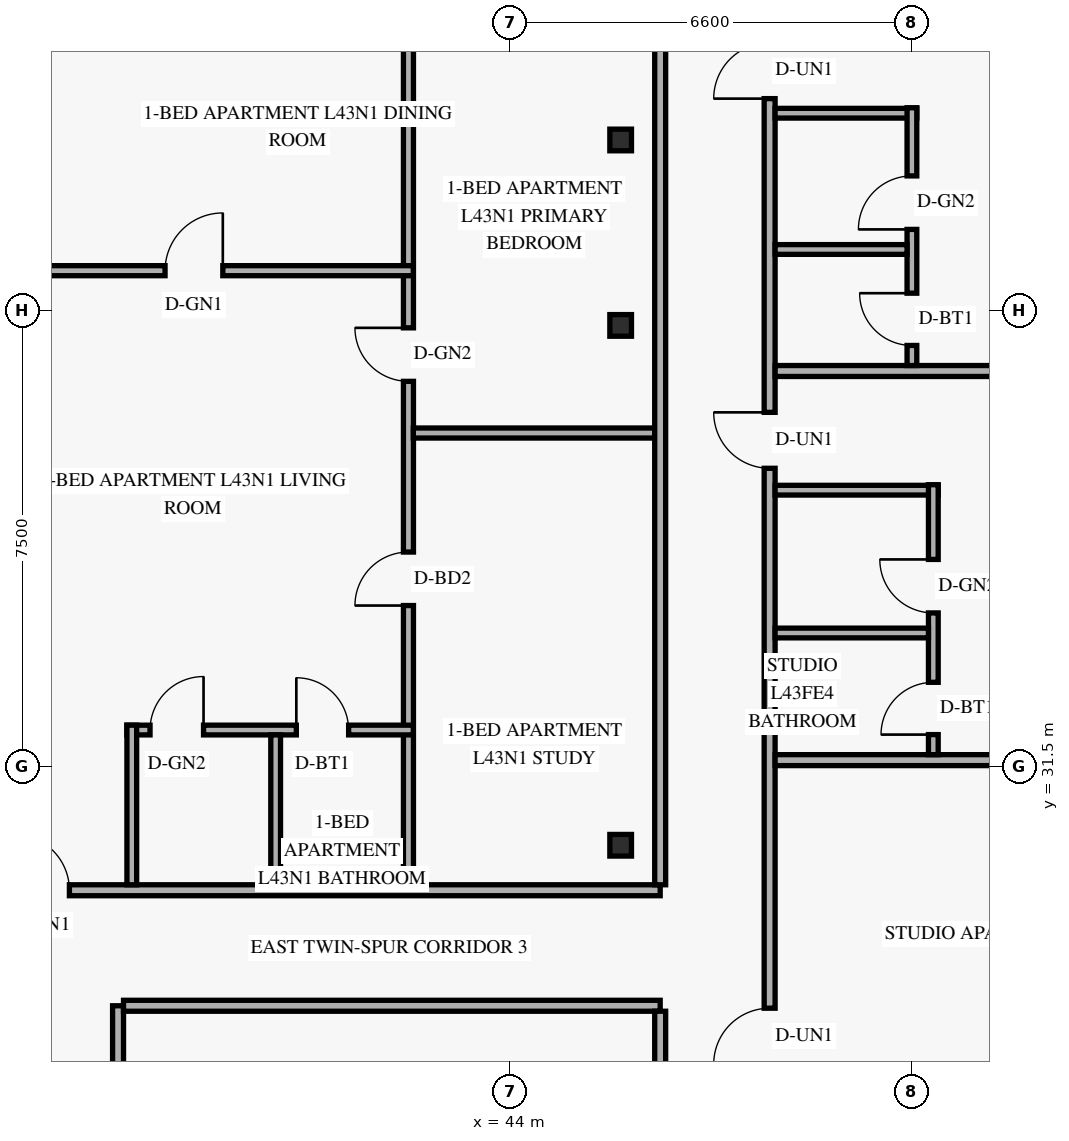
"""IFC4 building model, lengths in metres.
Left out: names, types, materials, properties, quantities, classifications, styles, units other than length and angle.
Written with IfcOpenShell. Run it as: python <this file> out.ifc"""

import sys

from ifc_helpers import new_model, si_unit, direction, frame, frame_2d, origin, origin_2d, place, context, subcontext, project, spatial, rectangle, hollow_rectangle, extrude, element, fill, save


model = new_model("IFC4")
c1 = context("Model", 3, precision=1e-05, world=origin(), true_north=direction((0.0, 1.0)))
c2 = subcontext(c1, "Body", "Model", "MODEL_VIEW")
j1 = project(units=[si_unit("LENGTHUNIT", "METRE"), si_unit("PLANEANGLEUNIT", "RADIAN")], contexts=[c1])
p1 = place(None, origin())
s1 = spatial("IfcSite", under=j1, at=p1, CompositionType="ELEMENT")
p2 = place(p1, origin())
s2 = spatial("IfcBuilding", under=s1, at=p2, CompositionType="ELEMENT")
p3 = place(p2, frame((0.0, 0.0, 166.2)))
s3 = spatial("IfcBuildingStorey", under=s2, at=p3, CompositionType="ELEMENT", Elevation=166.2)
for number, where, z_axis, x_axis in (
    (1, (45.753, 30.2, 0.0), (0.035, 0.0, 0.999), (0.0, 1.0, 0.0)),
    (2, (45.753, 38.75, 0.0), (0.035, 0.0, 0.999), (0.0, 1.0, 0.0)),
    (3, (45.753, 41.8, 0.0), (0.035, 0.0, 0.999), (0.0, 1.0, 0.0)),
):
    element("IfcColumn", number, at=place(p3, frame(where, z_axis=z_axis, x_axis=x_axis)), inside=s3, PredefinedType="COLUMN", context=c2, shape_type="SweptSolid", body=[
        extrude(hollow_rectangle(XDim=0.356, YDim=0.356, WallThickness=0.016, at=origin_2d()), origin(), (0.0, 0.0, 1.0), 3.602),
    ])
p4 = place(p3, frame((37.55, 17.28, 0.0), z_axis=(0.0, 0.0, 1.0), x_axis=(0.0, 1.0, 0.0)))
e4 = element("IfcWall", 4, at=p4, inside=s3, PredefinedType="STANDARD", context=c2, shape_type="SweptSolid", body=[
    extrude(rectangle(XDim=10.28, YDim=0.18, at=frame_2d((5.14, 0.0))), origin(), (0.0, 0.0, 1.0), 2.73),
])
p5 = place(p4, frame((5.0, 0.0, 0.0)))
e5 = element("IfcOpeningElement", 5, at=p5, cuts=e4, PredefinedType="OPENING", context=c2, shape_type="SweptSolid", body=[
    extrude(rectangle(XDim=0.92, YDim=2.15, at=frame_2d((0.46, 1.075))), frame((0.0, 0.1, 0.0), z_axis=(0.0, -1.0, 0.0), x_axis=(1.0, 0.0, 0.0)), (0.0, 0.0, 1.0), 0.2),
])
p6 = place(p3, frame((37.64, 27.56, 0.0), z_axis=(0.0, 0.0, 1.0), x_axis=(1.0, 0.0, 0.0)))
e6 = element("IfcWall", 6, at=p6, inside=s3, PredefinedType="STANDARD", context=c2, shape_type="SweptSolid", body=[
    extrude(rectangle(XDim=8.826, YDim=0.18, at=frame_2d((4.413, 0.0))), origin(), (0.0, 0.0, 1.0), 2.73),
])
p7 = place(p3, frame((35.51, 29.46, 0.0), z_axis=(0.0, 0.0, 1.0), x_axis=(1.0, 0.0, 0.0)))
e7 = element("IfcWall", 7, at=p7, inside=s3, PredefinedType="STANDARD", context=c2, shape_type="SweptSolid", body=[
    extrude(rectangle(XDim=10.956, YDim=0.18, at=frame_2d((5.478, 0.0))), origin(), (0.0, 0.0, 1.0), 2.73),
])
p8 = place(p7, frame((0.32, 0.0, 0.0)))
e8 = element("IfcOpeningElement", 8, at=p8, cuts=e7, PredefinedType="OPENING", context=c2, shape_type="SweptSolid", body=[
    extrude(rectangle(XDim=0.92, YDim=2.15, at=frame_2d((0.46, 1.075))), frame((0.0, 0.1, 0.0), z_axis=(0.0, -1.0, 0.0), x_axis=(1.0, 0.0, 0.0)), (0.0, 0.0, 1.0), 0.2),
])
p9 = place(p3, frame((42.326, 29.55, 0.0), z_axis=(0.0, 0.0, 1.0), x_axis=(0.0, 1.0, 0.0)))
e9 = element("IfcWall", 9, at=p9, inside=s3, PredefinedType="PARTITIONING", context=c2, shape_type="SweptSolid", body=[
    extrude(rectangle(XDim=14.17, YDim=0.165, at=frame_2d((7.085, 0.0))), origin(), (0.0, 0.0, 1.0), 2.73),
])
p10 = place(p9, frame((4.593, 0.0, 0.0)))
e10 = element("IfcOpeningElement", 10, at=p10, cuts=e9, PredefinedType="OPENING", context=c2, shape_type="SweptSolid", body=[
    extrude(rectangle(XDim=0.88, YDim=2.14, at=frame_2d((0.44, 1.07))), frame((0.0, 0.093, 0.0), z_axis=(0.0, -1.0, 0.0), x_axis=(1.0, 0.0, 0.0)), (0.0, 0.0, 1.0), 0.185),
])
p11 = place(p9, frame((8.28, 0.0, 0.0)))
e11 = element("IfcOpeningElement", 11, at=p11, cuts=e9, PredefinedType="OPENING", context=c2, shape_type="SweptSolid", body=[
    extrude(rectangle(XDim=0.88, YDim=2.12, at=frame_2d((0.44, 1.06))), frame((0.0, 0.093, 0.0), z_axis=(0.0, -1.0, 0.0), x_axis=(1.0, 0.0, 0.0)), (0.0, 0.0, 1.0), 0.185),
])
p12 = place(p3, frame((37.696, 32.095, 0.0), z_axis=(0.0, 0.0, 1.0), x_axis=(1.0, 0.0, 0.0)))
e12 = element("IfcWall", 12, at=p12, inside=s3, PredefinedType="PLUMBINGWALL", context=c2, shape_type="SweptSolid", body=[
    extrude(rectangle(XDim=4.71, YDim=0.16, at=frame_2d((2.355, 0.0))), origin(), (0.0, 0.0, 1.0), 3.36),
])
p13 = place(p12, frame((0.38, 0.0, 0.0)))
e13 = element("IfcOpeningElement", 13, at=p13, cuts=e12, PredefinedType="OPENING", context=c2, shape_type="SweptSolid", body=[
    extrude(rectangle(XDim=0.88, YDim=2.12, at=frame_2d((0.44, 1.06))), frame((0.0, 0.09, 0.0), z_axis=(0.0, -1.0, 0.0), x_axis=(1.0, 0.0, 0.0)), (0.0, 0.0, 1.0), 0.18),
])
p14 = place(p12, frame((2.786, 0.0, 0.0)))
e14 = element("IfcOpeningElement", 14, at=p14, cuts=e12, PredefinedType="OPENING", context=c2, shape_type="SweptSolid", body=[
    extrude(rectangle(XDim=0.86, YDim=2.12, at=frame_2d((0.43, 1.06))), frame((0.0, 0.09, 0.0), z_axis=(0.0, -1.0, 0.0), x_axis=(1.0, 0.0, 0.0)), (0.0, 0.0, 1.0), 0.18),
])
p15 = place(p3, frame((37.776, 29.55, 0.0), z_axis=(0.0, 0.0, 1.0), x_axis=(0.0, 1.0, 0.0)))
e15 = element("IfcWall", 15, at=p15, inside=s3, PredefinedType="PLUMBINGWALL", context=c2, shape_type="SweptSolid", body=[
    extrude(rectangle(XDim=2.625, YDim=0.16, at=frame_2d((1.312, 0.0))), origin(), (0.0, 0.0, 1.0), 2.73),
])
p16 = place(p3, frame((40.142, 29.55, 0.0), z_axis=(0.0, 0.0, 1.0), x_axis=(0.0, 1.0, 0.0)))
e16 = element("IfcWall", 16, at=p16, inside=s3, PredefinedType="PLUMBINGWALL", context=c2, shape_type="SweptSolid", body=[
    extrude(rectangle(XDim=2.465, YDim=0.16, at=frame_2d((1.232, 0.0))), origin(), (0.0, 0.0, 1.0), 2.73),
])
p17 = place(p3, frame((35.51, 39.65, 0.0), z_axis=(0.0, 0.0, 1.0), x_axis=(1.0, 0.0, 0.0)))
e17 = element("IfcWall", 17, at=p17, inside=s3, PredefinedType="PARTITIONING", context=c2, shape_type="SweptSolid", body=[
    extrude(rectangle(XDim=6.896, YDim=0.165, at=frame_2d((3.448, 0.0))), origin(), (0.0, 0.0, 1.0), 3.36),
])
p18 = place(p17, frame((2.813, 0.0, 0.0)))
e18 = element("IfcOpeningElement", 18, at=p18, cuts=e17, PredefinedType="OPENING", context=c2, shape_type="SweptSolid", body=[
    extrude(rectangle(XDim=0.95, YDim=2.15, at=frame_2d((0.475, 1.075))), frame((0.0, 0.093, 0.0), z_axis=(0.0, -1.0, 0.0), x_axis=(1.0, 0.0, 0.0)), (0.0, 0.0, 1.0), 0.185),
])
p19 = place(p3, frame((42.406, 36.98, 0.0), z_axis=(0.0, 0.0, 1.0), x_axis=(1.0, 0.0, 0.0)))
e19 = element("IfcWall", 19, at=p19, inside=s3, PredefinedType="PARTITIONING", context=c2, shape_type="SweptSolid", body=[
    extrude(rectangle(XDim=3.97, YDim=0.165, at=frame_2d((1.985, 0.0))), origin(), (0.0, 0.0, 1.0), 2.73),
])
p20 = place(p3, frame((48.266, 4.28, 0.0), z_axis=(0.0, 0.0, 1.0), x_axis=(0.0, 1.0, 0.0)))
e20 = element("IfcWall", 20, at=p20, inside=s3, PredefinedType="STANDARD", context=c2, shape_type="SweptSolid", body=[
    extrude(rectangle(XDim=39.44, YDim=0.18, at=frame_2d((19.72, 0.0))), origin(), (0.0, 0.0, 1.0), 2.73),
])
p21 = place(p20, frame((2.18, 0.0, 0.0)))
e21 = element("IfcOpeningElement", 21, at=p21, cuts=e20, PredefinedType="OPENING", context=c2, shape_type="SweptSolid", body=[
    extrude(rectangle(XDim=0.92, YDim=2.15, at=frame_2d((0.46, 1.075))), frame((0.0, 0.1, 0.0), z_axis=(0.0, -1.0, 0.0), x_axis=(1.0, 0.0, 0.0)), (0.0, 0.0, 1.0), 0.2),
])
p22 = place(p20, frame((13.02, 0.0, 0.0)))
e22 = element("IfcOpeningElement", 22, at=p22, cuts=e20, PredefinedType="OPENING", context=c2, shape_type="SweptSolid", body=[
    extrude(rectangle(XDim=0.92, YDim=2.15, at=frame_2d((0.46, 1.075))), frame((0.0, 0.1, 0.0), z_axis=(0.0, -1.0, 0.0), x_axis=(1.0, 0.0, 0.0)), (0.0, 0.0, 1.0), 0.2),
])
p23 = place(p20, frame((22.32, 0.0, 0.0)))
e23 = element("IfcOpeningElement", 23, at=p23, cuts=e20, PredefinedType="OPENING", context=c2, shape_type="SweptSolid", body=[
    extrude(rectangle(XDim=0.92, YDim=2.15, at=frame_2d((0.46, 1.075))), frame((0.0, 0.1, 0.0), z_axis=(0.0, -1.0, 0.0), x_axis=(1.0, 0.0, 0.0)), (0.0, 0.0, 1.0), 0.2),
])
p24 = place(p20, frame((32.12, 0.0, 0.0)))
e24 = element("IfcOpeningElement", 24, at=p24, cuts=e20, PredefinedType="OPENING", context=c2, shape_type="SweptSolid", body=[
    extrude(rectangle(XDim=0.92, YDim=2.15, at=frame_2d((0.46, 1.075))), frame((0.0, 0.1, 0.0), z_axis=(0.0, -1.0, 0.0), x_axis=(1.0, 0.0, 0.0)), (0.0, 0.0, 1.0), 0.2),
])
p25 = place(p20, frame((38.2, 0.0, 0.0)))
e25 = element("IfcOpeningElement", 25, at=p25, cuts=e20, PredefinedType="OPENING", context=c2, shape_type="SweptSolid", body=[
    extrude(rectangle(XDim=0.92, YDim=2.15, at=frame_2d((0.46, 1.075))), frame((0.0, 0.1, 0.0), z_axis=(0.0, -1.0, 0.0), x_axis=(1.0, 0.0, 0.0)), (0.0, 0.0, 1.0), 0.2),
])
p26 = place(p3, frame((46.466, 17.37, 0.0), z_axis=(0.0, 0.0, 1.0), x_axis=(0.0, 1.0, 0.0)))
e26 = element("IfcWall", 26, at=p26, inside=s3, PredefinedType="STANDARD", context=c2, shape_type="SweptSolid", body=[
    extrude(rectangle(XDim=10.1, YDim=0.18, at=frame_2d((5.05, 0.0))), origin(), (0.0, 0.0, 1.0), 2.73),
])
p27 = place(p3, frame((46.466, 29.55, 0.0), z_axis=(0.0, 0.0, 1.0), x_axis=(0.0, 1.0, 0.0)))
e27 = element("IfcWall", 27, at=p27, inside=s3, PredefinedType="STANDARD", context=c2, shape_type="SweptSolid", body=[
    extrude(rectangle(XDim=14.17, YDim=0.18, at=frame_2d((7.085, 0.0))), origin(), (0.0, 0.0, 1.0), 2.73),
])
p28 = place(p3, frame((48.356, 31.6, 0.0), z_axis=(0.0, 0.0, 1.0), x_axis=(1.0, 0.0, 0.0)))
e28 = element("IfcWall", 28, at=p28, inside=s3, PredefinedType="PARTITIONING", context=c2, shape_type="SweptSolid", body=[
    extrude(rectangle(XDim=9.964, YDim=0.18, at=frame_2d((4.982, 0.0))), origin(), (0.0, 0.0, 1.0), 2.879),
])
p29 = place(p3, frame((48.356, 36.04, 0.0), z_axis=(0.0, 0.0, 1.0), x_axis=(1.0, 0.0, 0.0)))
e29 = element("IfcWall", 29, at=p29, inside=s3, PredefinedType="PLUMBINGWALL", context=c2, shape_type="SweptSolid", body=[
    extrude(rectangle(XDim=2.682, YDim=0.16, at=frame_2d((1.341, 0.0))), origin(), (0.0, 0.0, 1.0), 3.36),
])
p30 = place(p3, frame((50.958, 31.69, 0.0), z_axis=(0.0, 0.0, 1.0), x_axis=(0.0, 1.0, 0.0)))
e30 = element("IfcWall", 30, at=p30, inside=s3, PredefinedType="PLUMBINGWALL", context=c2, shape_type="SweptSolid", body=[
    extrude(rectangle(XDim=4.44, YDim=0.16, at=frame_2d((2.22, 0.0))), origin(), (0.0, 0.0, 1.0), 2.984),
])
p31 = place(p30, frame((0.33, 0.0, 0.0)))
e31 = element("IfcOpeningElement", 31, at=p31, cuts=e30, PredefinedType="OPENING", context=c2, shape_type="SweptSolid", body=[
    extrude(rectangle(XDim=0.86, YDim=2.12, at=frame_2d((0.43, 1.06))), frame((0.0, 0.09, 0.0), z_axis=(0.0, -1.0, 0.0), x_axis=(1.0, 0.0, 0.0)), (0.0, 0.0, 1.0), 0.18),
])
p32 = place(p30, frame((2.331, 0.0, 0.0)))
e32 = element("IfcOpeningElement", 32, at=p32, cuts=e30, PredefinedType="OPENING", context=c2, shape_type="SweptSolid", body=[
    extrude(rectangle(XDim=0.88, YDim=2.12, at=frame_2d((0.44, 1.06))), frame((0.0, 0.09, 0.0), z_axis=(0.0, -1.0, 0.0), x_axis=(1.0, 0.0, 0.0)), (0.0, 0.0, 1.0), 0.18),
])
p33 = place(p3, frame((48.356, 33.691, 0.0), z_axis=(0.0, 0.0, 1.0), x_axis=(1.0, 0.0, 0.0)))
e33 = element("IfcWall", 33, at=p33, inside=s3, PredefinedType="PLUMBINGWALL", context=c2, shape_type="SweptSolid", body=[
    extrude(rectangle(XDim=2.522, YDim=0.16, at=frame_2d((1.261, 0.0))), origin(), (0.0, 0.0, 1.0), 3.36),
])
p34 = place(p3, frame((48.356, 38.0, 0.0), z_axis=(0.0, 0.0, 1.0), x_axis=(1.0, 0.0, 0.0)))
e34 = element("IfcWall", 34, at=p34, inside=s3, PredefinedType="PARTITIONING", context=c2, shape_type="SweptSolid", body=[
    extrude(rectangle(XDim=9.964, YDim=0.18, at=frame_2d((4.982, 0.0))), origin(), (0.0, 0.0, 1.0), 2.879),
])
p35 = place(p3, frame((48.356, 42.24, 0.0), z_axis=(0.0, 0.0, 1.0), x_axis=(1.0, 0.0, 0.0)))
e35 = element("IfcWall", 35, at=p35, inside=s3, PredefinedType="PLUMBINGWALL", context=c2, shape_type="SweptSolid", body=[
    extrude(rectangle(XDim=2.33, YDim=0.16, at=frame_2d((1.165, 0.0))), origin(), (0.0, 0.0, 1.0), 3.36),
])
p36 = place(p3, frame((50.606, 38.09, 0.0), z_axis=(0.0, 0.0, 1.0), x_axis=(0.0, 1.0, 0.0)))
e36 = element("IfcWall", 36, at=p36, inside=s3, PredefinedType="PLUMBINGWALL", context=c2, shape_type="SweptSolid", body=[
    extrude(rectangle(XDim=4.24, YDim=0.16, at=frame_2d((2.12, 0.0))), origin(), (0.0, 0.0, 1.0), 2.73),
])
p37 = place(p36, frame((0.33, 0.0, 0.0)))
e37 = element("IfcOpeningElement", 37, at=p37, cuts=e36, PredefinedType="OPENING", context=c2, shape_type="SweptSolid", body=[
    extrude(rectangle(XDim=0.86, YDim=2.12, at=frame_2d((0.43, 1.06))), frame((0.0, 0.09, 0.0), z_axis=(0.0, -1.0, 0.0), x_axis=(1.0, 0.0, 0.0)), (0.0, 0.0, 1.0), 0.18),
])
p38 = place(p36, frame((2.239, 0.0, 0.0)))
e38 = element("IfcOpeningElement", 38, at=p38, cuts=e36, PredefinedType="OPENING", context=c2, shape_type="SweptSolid", body=[
    extrude(rectangle(XDim=0.88, YDim=2.12, at=frame_2d((0.44, 1.06))), frame((0.0, 0.09, 0.0), z_axis=(0.0, -1.0, 0.0), x_axis=(1.0, 0.0, 0.0)), (0.0, 0.0, 1.0), 0.18),
])
p39 = place(p3, frame((48.356, 39.999, 0.0), z_axis=(0.0, 0.0, 1.0), x_axis=(1.0, 0.0, 0.0)))
e39 = element("IfcWall", 39, at=p39, inside=s3, PredefinedType="PLUMBINGWALL", context=c2, shape_type="SweptSolid", body=[
    extrude(rectangle(XDim=2.17, YDim=0.16, at=frame_2d((1.085, 0.0))), origin(), (0.0, 0.0, 1.0), 3.36),
])
p40 = place(p18, origin())
e40 = element("IfcDoor", 40, at=p40, inside=s3, OperationType="SINGLE_SWING_RIGHT", PredefinedType="DOOR", context=c2, shape_type="SweptSolid", body=[
    extrude(rectangle(XDim=0.95, YDim=2.15, at=frame_2d((0.475, 1.075))), frame((0.0, 0.025, 0.0), z_axis=(0.0, -1.0, 0.0), x_axis=(1.0, 0.0, 0.0)), (0.0, 0.0, 1.0), 0.05),
])
fill(e18, e40)
p41 = place(p8, origin())
e41 = element("IfcDoor", 41, at=p41, inside=s3, OperationType="SINGLE_SWING_LEFT", PredefinedType="DOOR", context=c2, shape_type="SweptSolid", body=[
    extrude(rectangle(XDim=0.92, YDim=2.15, at=frame_2d((0.46, 1.075))), frame((0.0, 0.025, 0.0), z_axis=(0.0, -1.0, 0.0), x_axis=(1.0, 0.0, 0.0)), (0.0, 0.0, 1.0), 0.05),
])
fill(e8, e41)
p42 = place(p13, origin())
e42 = element("IfcDoor", 42, at=p42, inside=s3, OperationType="SINGLE_SWING_RIGHT", PredefinedType="DOOR", context=c2, shape_type="SweptSolid", body=[
    extrude(rectangle(XDim=0.88, YDim=2.12, at=frame_2d((0.44, 1.06))), frame((0.0, 0.025, 0.0), z_axis=(0.0, -1.0, 0.0), x_axis=(1.0, 0.0, 0.0)), (0.0, 0.0, 1.0), 0.05),
])
fill(e13, e42)
p43 = place(p14, origin())
e43 = element("IfcDoor", 43, at=p43, inside=s3, OperationType="SINGLE_SWING_LEFT", PredefinedType="DOOR", context=c2, shape_type="SweptSolid", body=[
    extrude(rectangle(XDim=0.86, YDim=2.12, at=frame_2d((0.43, 1.06))), frame((0.0, 0.025, 0.0), z_axis=(0.0, -1.0, 0.0), x_axis=(1.0, 0.0, 0.0)), (0.0, 0.0, 1.0), 0.05),
])
fill(e14, e43)
p44 = place(p10, origin())
e44 = element("IfcDoor", 44, at=p44, inside=s3, OperationType="SINGLE_SWING_LEFT", PredefinedType="DOOR", context=c2, shape_type="SweptSolid", body=[
    extrude(rectangle(XDim=0.88, YDim=2.14, at=frame_2d((0.44, 1.07))), frame((0.0, 0.025, 0.0), z_axis=(0.0, -1.0, 0.0), x_axis=(1.0, 0.0, 0.0)), (0.0, 0.0, 1.0), 0.05),
])
fill(e10, e44)
p45 = place(p11, origin())
e45 = element("IfcDoor", 45, at=p45, inside=s3, OperationType="SINGLE_SWING_RIGHT", PredefinedType="DOOR", context=c2, shape_type="SweptSolid", body=[
    extrude(rectangle(XDim=0.88, YDim=2.12, at=frame_2d((0.44, 1.06))), frame((0.0, 0.025, 0.0), z_axis=(0.0, -1.0, 0.0), x_axis=(1.0, 0.0, 0.0)), (0.0, 0.0, 1.0), 0.05),
])
fill(e11, e45)
p46 = place(p23, origin())
e46 = element("IfcDoor", 46, at=p46, inside=s3, OperationType="SINGLE_SWING_LEFT", PredefinedType="DOOR", context=c2, shape_type="SweptSolid", body=[
    extrude(rectangle(XDim=0.92, YDim=2.15, at=frame_2d((0.46, 1.075))), frame((0.0, 0.025, 0.0), z_axis=(0.0, -1.0, 0.0), x_axis=(1.0, 0.0, 0.0)), (0.0, 0.0, 1.0), 0.05),
])
fill(e23, e46)
p47 = place(p24, origin())
e47 = element("IfcDoor", 47, at=p47, inside=s3, OperationType="SINGLE_SWING_RIGHT", PredefinedType="DOOR", context=c2, shape_type="SweptSolid", body=[
    extrude(rectangle(XDim=0.92, YDim=2.15, at=frame_2d((0.46, 1.075))), frame((0.0, 0.025, 0.0), z_axis=(0.0, -1.0, 0.0), x_axis=(1.0, 0.0, 0.0)), (0.0, 0.0, 1.0), 0.05),
])
fill(e24, e47)
p48 = place(p31, origin())
e48 = element("IfcDoor", 48, at=p48, inside=s3, OperationType="SINGLE_SWING_LEFT", PredefinedType="DOOR", context=c2, shape_type="SweptSolid", body=[
    extrude(rectangle(XDim=0.86, YDim=2.12, at=frame_2d((0.43, 1.06))), frame((0.0, 0.025, 0.0), z_axis=(0.0, -1.0, 0.0), x_axis=(1.0, 0.0, 0.0)), (0.0, 0.0, 1.0), 0.05),
])
fill(e31, e48)
p49 = place(p32, origin())
e49 = element("IfcDoor", 49, at=p49, inside=s3, OperationType="SINGLE_SWING_RIGHT", PredefinedType="DOOR", context=c2, shape_type="SweptSolid", body=[
    extrude(rectangle(XDim=0.88, YDim=2.12, at=frame_2d((0.44, 1.06))), frame((0.0, 0.025, 0.0), z_axis=(0.0, -1.0, 0.0), x_axis=(1.0, 0.0, 0.0)), (0.0, 0.0, 1.0), 0.05),
])
fill(e32, e49)
p50 = place(p25, origin())
e50 = element("IfcDoor", 50, at=p50, inside=s3, OperationType="SINGLE_SWING_LEFT", PredefinedType="DOOR", context=c2, shape_type="SweptSolid", body=[
    extrude(rectangle(XDim=0.92, YDim=2.15, at=frame_2d((0.46, 1.075))), frame((0.0, 0.025, 0.0), z_axis=(0.0, -1.0, 0.0), x_axis=(1.0, 0.0, 0.0)), (0.0, 0.0, 1.0), 0.05),
])
fill(e25, e50)
p51 = place(p37, origin())
e51 = element("IfcDoor", 51, at=p51, inside=s3, OperationType="SINGLE_SWING_RIGHT", PredefinedType="DOOR", context=c2, shape_type="SweptSolid", body=[
    extrude(rectangle(XDim=0.86, YDim=2.12, at=frame_2d((0.43, 1.06))), frame((0.0, 0.025, 0.0), z_axis=(0.0, -1.0, 0.0), x_axis=(1.0, 0.0, 0.0)), (0.0, 0.0, 1.0), 0.05),
])
fill(e37, e51)
p52 = place(p38, origin())
e52 = element("IfcDoor", 52, at=p52, inside=s3, OperationType="SINGLE_SWING_LEFT", PredefinedType="DOOR", context=c2, shape_type="SweptSolid", body=[
    extrude(rectangle(XDim=0.88, YDim=2.12, at=frame_2d((0.44, 1.06))), frame((0.0, 0.025, 0.0), z_axis=(0.0, -1.0, 0.0), x_axis=(1.0, 0.0, 0.0)), (0.0, 0.0, 1.0), 0.05),
])
fill(e38, e52)
save(model, sys.argv[1])
